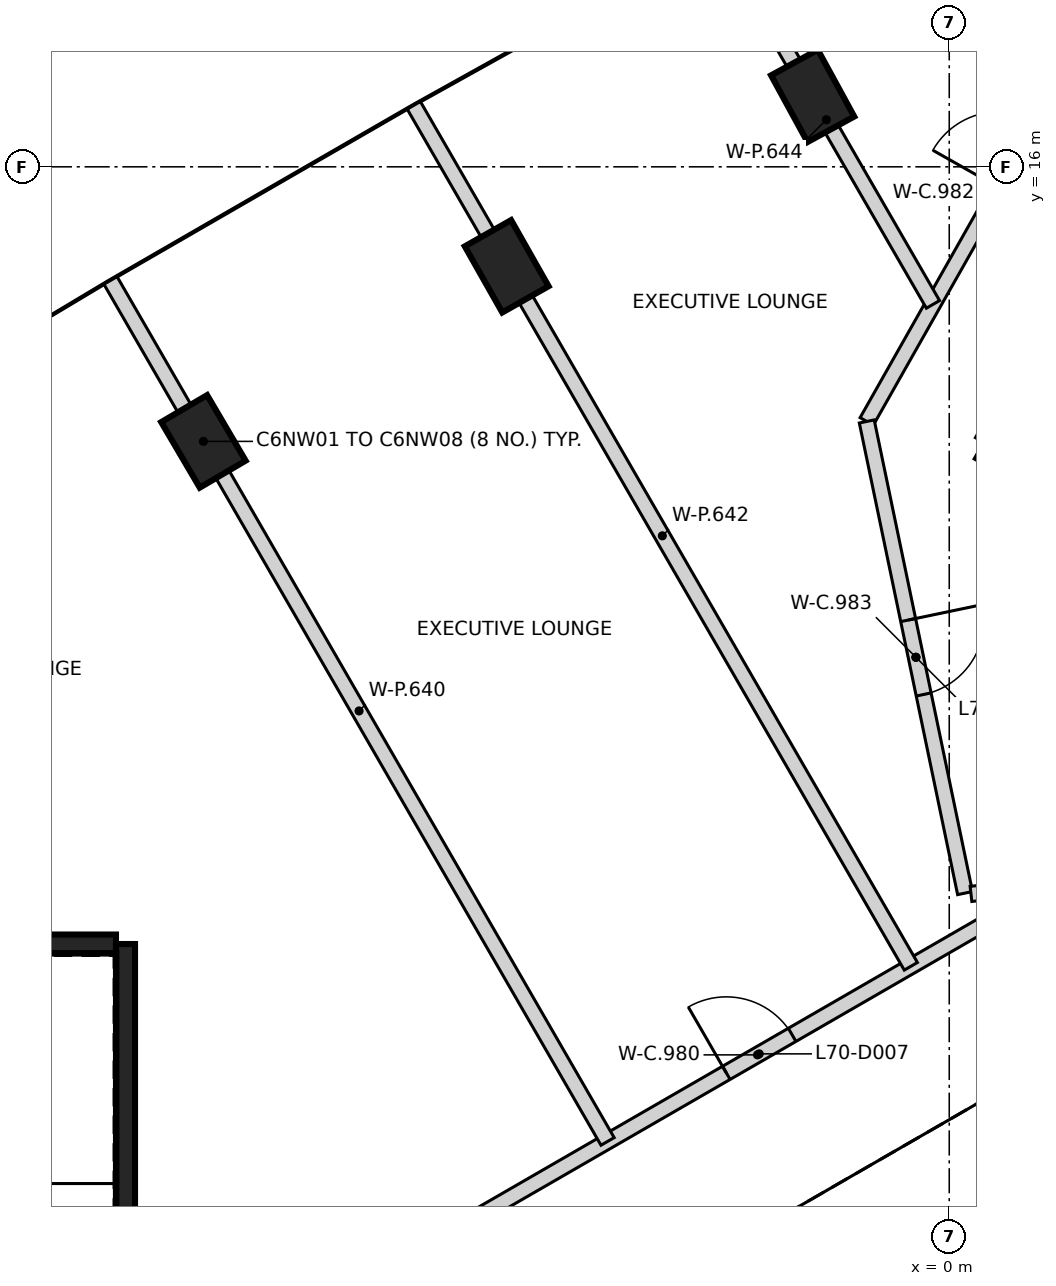
"""IFC4 building model, lengths in metres.
Left out: names, types, materials, properties, quantities, classifications, styles, units other than length and angle.
Written with IfcOpenShell. Run it as: python <this file> out.ifc"""

import sys

from ifc_helpers import new_model, si_unit, direction, frame, frame_2d, origin, origin_2d, place, context, subcontext, project, spatial, rectangle, extrude, element, fill, save


model = new_model("IFC4")
c1 = context("Model", 3, precision=1e-05, world=origin(), true_north=direction((0.0, 1.0)))
c2 = subcontext(c1, "Body", "Model", "MODEL_VIEW")
j1 = project(units=[si_unit("LENGTHUNIT", "METRE"), si_unit("PLANEANGLEUNIT", "RADIAN")], contexts=[c1])
p1 = place(None, origin())
s1 = spatial("IfcSite", under=j1, at=p1, CompositionType="ELEMENT")
p2 = place(p1, origin())
s2 = spatial("IfcBuilding", under=s1, at=p2, CompositionType="ELEMENT")
p3 = place(p2, frame((0.0, 0.0, 276.6)))
s3 = spatial("IfcBuildingStorey", under=s2, at=p3, CompositionType="ELEMENT", Elevation=276.6)
for number, where, z_axis, x_axis in (
    (1, (-1.797, 16.932, -0.35), (0.0, 0.0, 1.0), (-0.479, 0.878, 0.0)),
    (2, (-5.822, 14.691, -0.35), (0.0, 0.0, 1.0), (-0.493, 0.87, 0.0)),
    (3, (-9.812, 12.388, -0.35), (0.0, 0.0, 1.0), (-0.507, 0.862, 0.0)),
):
    element("IfcColumn", number, at=place(p3, frame(where, z_axis=z_axis, x_axis=x_axis)), inside=s3, PredefinedType="COLUMN", context=c2, shape_type="SweptSolid", body=[
        extrude(rectangle(XDim=1.0, YDim=0.7, at=origin_2d()), origin(), (0.0, 0.0, 1.0), 3.6),
    ])
p4 = place(p3, frame((-10.837, 5.775, 0.0), z_axis=(0.0, 0.0, 1.0), x_axis=(0.0, -1.0, 0.0)))
e4 = element("IfcWall", 4, at=p4, inside=s3, PredefinedType="SHEAR", context=c2, shape_type="SweptSolid", body=[
    extrude(rectangle(XDim=11.55, YDim=0.25, at=frame_2d((5.775, 0.0))), origin(), (0.0, 0.0, 1.0), 3.25),
])
p5 = place(p4, frame((10.025, 0.0, 0.0)))
e5 = element("IfcOpeningElement", 5, at=p5, cuts=e4, PredefinedType="OPENING", context=c2, shape_type="SweptSolid", body=[
    extrude(rectangle(XDim=1.2, YDim=2.1, at=frame_2d((0.6, 1.05))), frame((0.0, 0.135, 0.0), z_axis=(0.0, -1.0, 0.0), x_axis=(1.0, 0.0, 0.0)), (0.0, 0.0, 1.0), 0.27),
])
p6 = place(p4, frame((8.725, 0.0, 0.0)))
e6 = element("IfcOpeningElement", 6, at=p6, cuts=e4, PredefinedType="OPENING", context=c2, shape_type="SweptSolid", body=[
    extrude(rectangle(XDim=1.2, YDim=2.1, at=frame_2d((0.6, 1.05))), frame((0.0, 0.135, 0.0), z_axis=(0.0, -1.0, 0.0), x_axis=(1.0, 0.0, 0.0)), (0.0, 0.0, 1.0), 0.27),
])
p7 = place(p3, frame((-16.472, 5.775, 0.0), z_axis=(0.0, 0.0, 1.0), x_axis=(1.0, 0.0, 0.0)))
e7 = element("IfcWall", 7, at=p7, inside=s3, PredefinedType="SHEAR", context=c2, shape_type="SweptSolid", body=[
    extrude(rectangle(XDim=5.51, YDim=0.25, at=frame_2d((2.755, 0.0))), origin(), (0.0, 0.0, 1.0), 3.25),
])
p8 = place(p3, frame((10.42, 6.498, 0.0), z_axis=(0.0, 0.0, 1.0), x_axis=(-0.866021906294, 0.500006057782, 0.0)))
e8 = element("IfcWall", 8, at=p8, inside=s3, PredefinedType="SHEAR", context=c2, shape_type="SweptSolid", body=[
    extrude(rectangle(XDim=11.55, YDim=0.25, at=frame_2d((5.775, 0.0))), origin(), (0.0, 0.0, 1.0), 3.25),
])
p9 = place(p8, frame((10.025, 0.0, 0.0)))
e9 = element("IfcOpeningElement", 9, at=p9, cuts=e8, PredefinedType="OPENING", context=c2, shape_type="SweptSolid", body=[
    extrude(rectangle(XDim=1.2, YDim=2.1, at=frame_2d((0.6, 1.05))), frame((0.0, 0.135, 0.0), z_axis=(0.0, -1.0, 0.0), x_axis=(1.0, 0.0, 0.0)), (0.0, 0.0, 1.0), 0.27),
])
p10 = place(p8, frame((8.725, 0.0, 0.0)))
e10 = element("IfcOpeningElement", 10, at=p10, cuts=e8, PredefinedType="OPENING", context=c2, shape_type="SweptSolid", body=[
    extrude(rectangle(XDim=1.2, YDim=2.1, at=frame_2d((0.6, 1.05))), frame((0.0, 0.135, 0.0), z_axis=(0.0, -1.0, 0.0), x_axis=(1.0, 0.0, 0.0)), (0.0, 0.0, 1.0), 0.27),
])
p11 = place(p3, frame((-6.4, 2.079, 0.0), z_axis=(0.0, 0.0, 1.0), x_axis=(0.866044821263, 0.499966366432, 0.0)))
e11 = element("IfcWall", 11, at=p11, inside=s3, PredefinedType="PARTITIONING", context=c2, shape_type="SweptSolid", body=[
    extrude(rectangle(XDim=8.953, YDim=0.2, at=frame_2d((4.477, 0.0))), origin(), (0.0, 0.0, 1.0), 3.25),
])
p12 = place(p11, frame((4.003, 0.0, 0.0)))
e12 = element("IfcOpeningElement", 12, at=p12, cuts=e11, PredefinedType="OPENING", context=c2, shape_type="SweptSolid", body=[
    extrude(rectangle(XDim=1.0, YDim=2.1, at=frame_2d((0.5, 1.05))), frame((0.0, 0.11, 0.0), z_axis=(0.0, -1.0, 0.0), x_axis=(1.0, 0.0, 0.0)), (0.0, 0.0, 1.0), 0.22),
])
p13 = place(p3, frame((-1.086, 12.65, 0.0), z_axis=(0.0, 0.0, 1.0), x_axis=(0.492563383526, 0.870276572826, 0.0)))
e13 = element("IfcWall", 13, at=p13, inside=s3, PredefinedType="PARTITIONING", context=c2, shape_type="SweptSolid", body=[
    extrude(rectangle(XDim=6.309, YDim=0.2, at=frame_2d((3.155, 0.0))), origin(), (0.0, 0.0, 1.0), 3.25),
])
p14 = place(p13, frame((3.533, 0.0, 0.0)))
e14 = element("IfcOpeningElement", 14, at=p14, cuts=e13, PredefinedType="OPENING", context=c2, shape_type="SweptSolid", body=[
    extrude(rectangle(XDim=1.0, YDim=2.1, at=frame_2d((0.5, 1.05))), frame((0.0, 0.11, 0.0), z_axis=(0.0, -1.0, 0.0), x_axis=(1.0, 0.0, 0.0)), (0.0, 0.0, 1.0), 0.22),
])
p15 = place(p3, frame((-1.085, 12.65, 0.0), z_axis=(0.0, 0.0, 1.0), x_axis=(0.203998862084, -0.97897112535, 0.0)))
e15 = element("IfcWall", 15, at=p15, inside=s3, PredefinedType="PARTITIONING", context=c2, shape_type="SweptSolid", body=[
    extrude(rectangle(XDim=6.338, YDim=0.2, at=frame_2d((3.169, 0.0))), origin(), (0.0, 0.0, 1.0), 3.25),
])
p16 = place(p15, frame((2.669, 0.0, 0.0)))
e16 = element("IfcOpeningElement", 16, at=p16, cuts=e15, PredefinedType="OPENING", context=c2, shape_type="SweptSolid", body=[
    extrude(rectangle(XDim=1.0, YDim=2.1, at=frame_2d((0.5, 1.05))), frame((0.0, 0.11, 0.0), z_axis=(0.0, -1.0, 0.0), x_axis=(1.0, 0.0, 0.0)), (0.0, 0.0, 1.0), 0.22),
])
p17 = place(p3, frame((0.286, 6.434, 0.0), z_axis=(0.0, 0.0, 1.0), x_axis=(0.993674480486, 0.112298828274, 0.0)))
e17 = element("IfcWall", 17, at=p17, inside=s3, PredefinedType="PARTITIONING", context=c2, shape_type="SweptSolid", body=[
    extrude(rectangle(XDim=0.574, YDim=0.2, at=frame_2d((0.287, 0.0))), origin(), (0.0, 0.0, 1.0), 3.25),
])
p18 = place(p3, frame((-11.035, 14.505, 0.0), z_axis=(0.0, 0.0, 1.0), x_axis=(0.499989597041, -0.866031409852, 0.0)))
e18 = element("IfcWall", 18, at=p18, inside=s3, PredefinedType="PARTITIONING", context=c2, shape_type="SweptSolid", body=[
    extrude(rectangle(XDim=13.079, YDim=0.2, at=frame_2d((6.54, 0.0))), origin(), (0.0, 0.0, 1.0), 3.25),
])
p19 = place(p3, frame((-7.044, 16.809, 0.0), z_axis=(0.0, 0.0, 1.0), x_axis=(0.499997679687, -0.866026743414, 0.0)))
e19 = element("IfcWall", 19, at=p19, inside=s3, PredefinedType="PARTITIONING", context=c2, shape_type="SweptSolid", body=[
    extrude(rectangle(XDim=13.079, YDim=0.2, at=frame_2d((6.54, 0.0))), origin(), (0.0, 0.0, 1.0), 3.25),
])
p20 = place(p3, frame((-3.02, 19.05, 0.0), z_axis=(0.0, 0.0, 1.0), x_axis=(0.499943402613, -0.866058077835, 0.0)))
e20 = element("IfcWall", 20, at=p20, inside=s3, PredefinedType="PARTITIONING", context=c2, shape_type="SweptSolid", body=[
    extrude(rectangle(XDim=5.612, YDim=0.2, at=frame_2d((2.806, 0.0))), origin(), (0.0, 0.0, 1.0), 3.25),
])
p21 = place(p16, frame((1.0, 0.0, 0.0), z_axis=(0.0, 0.0, 1.0), x_axis=(-1.0, 0.0, 0.0)))
e21 = element("IfcDoor", 21, at=p21, inside=s3, OperationType="SINGLE_SWING_LEFT", PredefinedType="DOOR", context=c2, shape_type="SweptSolid", body=[
    extrude(rectangle(XDim=1.0, YDim=2.1, at=frame_2d((0.5, 1.05))), frame((0.0, 0.025, 0.0), z_axis=(0.0, -1.0, 0.0), x_axis=(1.0, 0.0, 0.0)), (0.0, 0.0, 1.0), 0.05),
])
fill(e16, e21)
p22 = place(p12, origin())
e22 = element("IfcDoor", 22, at=p22, inside=s3, OperationType="SINGLE_SWING_LEFT", PredefinedType="DOOR", context=c2, shape_type="SweptSolid", body=[
    extrude(rectangle(XDim=1.0, YDim=2.1, at=frame_2d((0.5, 1.05))), frame((0.0, 0.025, 0.0), z_axis=(0.0, -1.0, 0.0), x_axis=(1.0, 0.0, 0.0)), (0.0, 0.0, 1.0), 0.05),
])
fill(e12, e22)
save(model, sys.argv[1])
